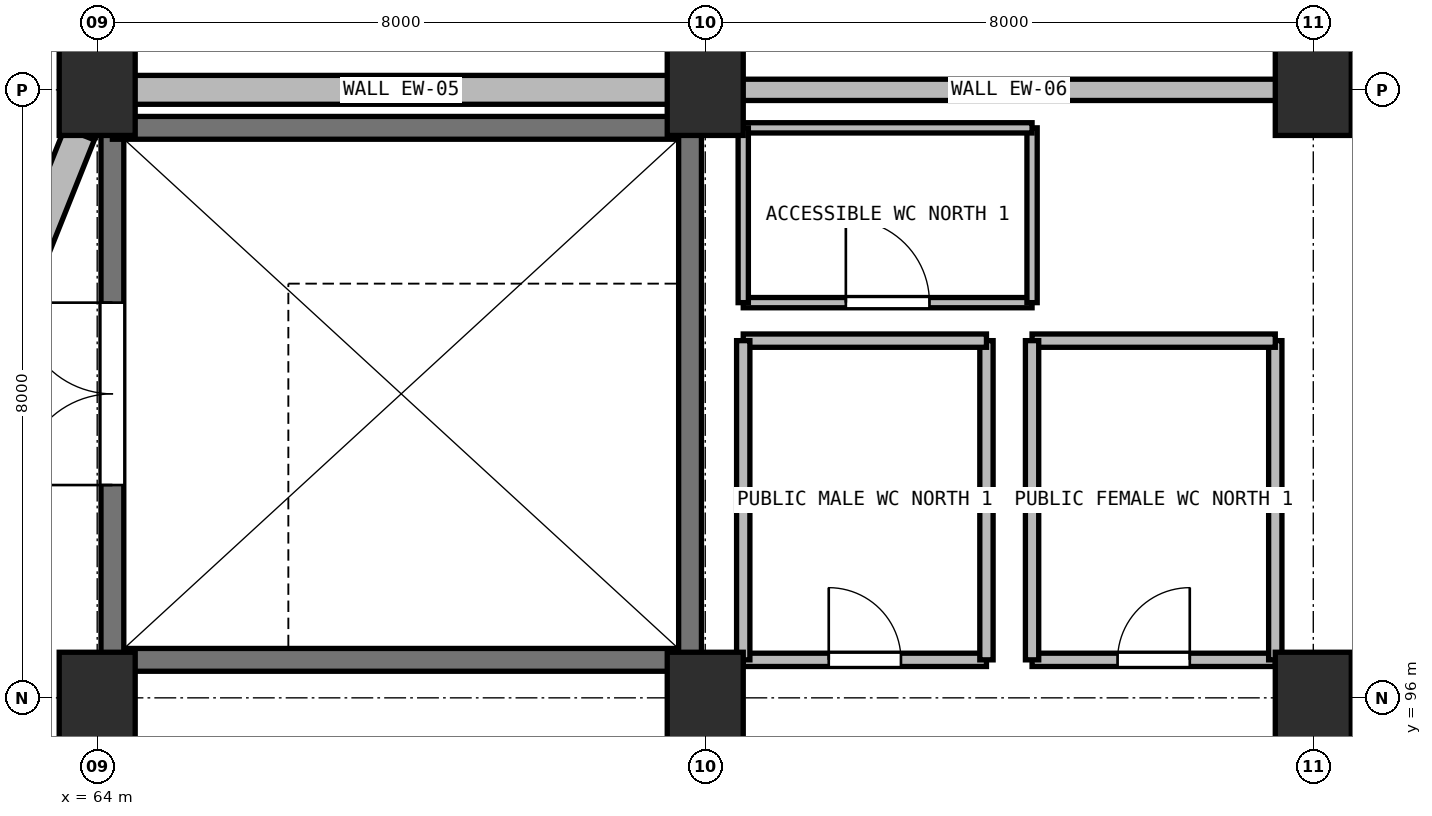
"""IFC4 building model, lengths in metres.
Left out: names, types, materials, properties, quantities, classifications, styles, units other than length and angle.
Written with IfcOpenShell. Run it as: python <this file> out.ifc"""

import sys

from ifc_helpers import new_model, si_unit, direction, frame, frame_2d, origin, origin_2d, place, context, subcontext, project, spatial, rectangle, extrude, element, fill, save


model = new_model("IFC4")
c1 = context("Model", 3, precision=1e-05, world=origin(), true_north=direction((0.0, 1.0)))
c2 = subcontext(c1, "Body", "Model", "MODEL_VIEW")
j1 = project(units=[si_unit("LENGTHUNIT", "METRE"), si_unit("PLANEANGLEUNIT", "RADIAN")], contexts=[c1])
p1 = place(None, origin())
s1 = spatial("IfcSite", under=j1, at=p1, CompositionType="ELEMENT")
p2 = place(p1, origin())
s2 = spatial("IfcBuilding", under=s1, at=p2, CompositionType="ELEMENT")
p3 = place(p2, frame((0.0, 0.0, 24.6)))
s3 = spatial("IfcBuildingStorey", under=s2, at=p3, CompositionType="ELEMENT", Elevation=24.6)
for number, where, z_axis, x_axis in (
    (1, (64.0, 96.0, 0.0), (0.0, 0.0, 1.0), (1.0, 0.0, 0.0)),
    (2, (64.0, 104.0, 0.0), (0.0, 0.0, 1.0), (1.0, 0.0, 0.0)),
    (3, (72.0, 96.0, 0.0), (0.0, 0.0, 1.0), (1.0, 0.0, 0.0)),
    (4, (72.0, 104.0, 0.0), (0.0, 0.0, 1.0), (1.0, 0.0, 0.0)),
    (5, (80.0, 96.0, 0.0), (0.0, 0.0, 1.0), (1.0, 0.0, 0.0)),
    (6, (80.0, 104.0, 0.0), (0.0, 0.0, 1.0), (1.0, 0.0, 0.0)),
):
    element("IfcColumn", number, at=place(p3, frame(where, z_axis=z_axis, x_axis=x_axis)), inside=s3, PredefinedType="COLUMN", context=c2, shape_type="SweptSolid", body=[
        extrude(rectangle(XDim=1.0, YDim=1.2, at=origin_2d()), origin(), (0.0, 0.0, 1.0), 4.8),
    ])
p4 = place(p3, frame((64.48, 104.0, 0.0), z_axis=(0.0, 0.0, 1.0), x_axis=(1.0, 0.0, 0.0)))
e7 = element("IfcWall", 7, at=p4, inside=s3, PredefinedType="SOLIDWALL", context=c2, shape_type="SweptSolid", body=[
    extrude(rectangle(XDim=7.04, YDim=0.38, at=frame_2d((3.52, 0.0))), origin(), (0.0, 0.0, 1.0), 3.71),
])
p5 = place(p3, frame((72.48, 104.0, 0.0), z_axis=(0.0, 0.0, 1.0), x_axis=(1.0, 0.0, 0.0)))
e8 = element("IfcWall", 8, at=p5, inside=s3, PredefinedType="SOLIDWALL", context=c2, shape_type="SweptSolid", body=[
    extrude(rectangle(XDim=7.04, YDim=0.28, at=frame_2d((3.52, 0.0))), origin(), (0.0, 0.0, 1.0), 3.71),
])
p6 = place(p3, frame((80.48, 104.0, 0.0), z_axis=(0.0, 0.0, 1.0), x_axis=(1.0, 0.0, 0.0)))
e9 = element("IfcWall", 9, at=p6, inside=s3, PredefinedType="SOLIDWALL", context=c2, shape_type="SweptSolid", body=[
    extrude(rectangle(XDim=7.04, YDim=0.29, at=frame_2d((3.52, 0.0))), origin(), (0.0, 0.0, 1.0), 3.71),
])
p7 = place(p3, frame((60.8, 96.0, 0.0), z_axis=(0.0, 0.0, 1.0), x_axis=(0.371395943584, 0.928474583976, 0.0)))
e10 = element("IfcWall", 10, at=p7, inside=s3, PredefinedType="SOLIDWALL", context=c2, shape_type="SweptSolid", body=[
    extrude(rectangle(XDim=7.991, YDim=0.42, at=frame_2d((3.996, 0.0))), origin(), (0.0, 0.0, 1.0), 2.86),
])
p8 = place(p3, frame((71.8, 96.5, 0.0), z_axis=(0.0, 0.0, 1.0), x_axis=(-1.0, 0.0, 0.0)))
e11 = element("IfcWall", 11, at=p8, inside=s3, PredefinedType="SHEAR", context=c2, shape_type="SweptSolid", body=[
    extrude(rectangle(XDim=7.6, YDim=0.3, at=frame_2d((3.8, 0.0))), origin(), (0.0, 0.0, 1.0), 4.55),
])
p9 = place(p3, frame((64.2, 96.5, 0.0), z_axis=(0.0, 0.0, 1.0), x_axis=(0.0, 1.0, 0.0)))
e12 = element("IfcWall", 12, at=p9, inside=s3, PredefinedType="SHEAR", context=c2, shape_type="SweptSolid", body=[
    extrude(rectangle(XDim=7.0, YDim=0.3, at=frame_2d((3.5, 0.0))), origin(), (0.0, 0.0, 1.0), 4.55),
])
p10 = place(p9, frame((2.3, 0.0, 0.0)))
e13 = element("IfcOpeningElement", 13, at=p10, cuts=e12, PredefinedType="OPENING", context=c2, shape_type="SweptSolid", body=[
    extrude(rectangle(XDim=2.4, YDim=2.2, at=frame_2d((1.2, 1.1))), frame((0.0, 0.16, 0.0), z_axis=(0.0, -1.0, 0.0), x_axis=(1.0, 0.0, 0.0)), (0.0, 0.0, 1.0), 0.32),
])
p11 = place(p3, frame((64.2, 103.5, 0.0), z_axis=(0.0, 0.0, 1.0), x_axis=(1.0, 0.0, 0.0)))
e14 = element("IfcWall", 14, at=p11, inside=s3, PredefinedType="SHEAR", context=c2, shape_type="SweptSolid", body=[
    extrude(rectangle(XDim=7.6, YDim=0.3, at=frame_2d((3.8, 0.0))), origin(), (0.0, 0.0, 1.0), 4.55),
])
p12 = place(p3, frame((71.8, 103.5, 0.0), z_axis=(0.0, 0.0, 1.0), x_axis=(0.0, -1.0, 0.0)))
e15 = element("IfcWall", 15, at=p12, inside=s3, PredefinedType="SHEAR", context=c2, shape_type="SweptSolid", body=[
    extrude(rectangle(XDim=7.0, YDim=0.3, at=frame_2d((3.5, 0.0))), origin(), (0.0, 0.0, 1.0), 4.55),
])
p13 = place(p3, frame((72.5, 96.5, 0.0), z_axis=(0.0, 0.0, 1.0), x_axis=(1.0, 0.0, 0.0)))
e16 = element("IfcWall", 16, at=p13, inside=s3, PredefinedType="PARTITIONING", context=c2, shape_type="SweptSolid", body=[
    extrude(rectangle(XDim=3.2, YDim=0.175, at=frame_2d((1.6, 0.0))), origin(), (0.0, 0.0, 1.0), 3.71),
])
p14 = place(p13, frame((1.125, 0.0, 0.0)))
e17 = element("IfcOpeningElement", 17, at=p14, cuts=e16, PredefinedType="OPENING", context=c2, shape_type="SweptSolid", body=[
    extrude(rectangle(XDim=0.95, YDim=2.15, at=frame_2d((0.475, 1.075))), frame((0.0, 0.098, 0.0), z_axis=(0.0, -1.0, 0.0), x_axis=(1.0, 0.0, 0.0)), (0.0, 0.0, 1.0), 0.195),
])
p15 = place(p3, frame((75.7, 96.5, 0.0), z_axis=(0.0, 0.0, 1.0), x_axis=(0.0, 1.0, 0.0)))
e18 = element("IfcWall", 18, at=p15, inside=s3, PredefinedType="PARTITIONING", context=c2, shape_type="SweptSolid", body=[
    extrude(rectangle(XDim=4.2, YDim=0.175, at=frame_2d((2.1, 0.0))), origin(), (0.0, 0.0, 1.0), 4.55),
])
p16 = place(p3, frame((75.7, 100.7, 0.0), z_axis=(0.0, 0.0, 1.0), x_axis=(-1.0, 0.0, 0.0)))
e19 = element("IfcWall", 19, at=p16, inside=s3, PredefinedType="PARTITIONING", context=c2, shape_type="SweptSolid", body=[
    extrude(rectangle(XDim=3.2, YDim=0.175, at=frame_2d((1.6, 0.0))), origin(), (0.0, 0.0, 1.0), 4.55),
])
p17 = place(p3, frame((72.5, 100.7, 0.0), z_axis=(0.0, 0.0, 1.0), x_axis=(0.0, -1.0, 0.0)))
e20 = element("IfcWall", 20, at=p17, inside=s3, PredefinedType="PARTITIONING", context=c2, shape_type="SweptSolid", body=[
    extrude(rectangle(XDim=4.2, YDim=0.175, at=frame_2d((2.1, 0.0))), origin(), (0.0, 0.0, 1.0), 3.71),
])
p18 = place(p3, frame((76.3, 96.5, 0.0), z_axis=(0.0, 0.0, 1.0), x_axis=(1.0, 0.0, 0.0)))
e21 = element("IfcWall", 21, at=p18, inside=s3, PredefinedType="PARTITIONING", context=c2, shape_type="SweptSolid", body=[
    extrude(rectangle(XDim=3.2, YDim=0.175, at=frame_2d((1.6, 0.0))), origin(), (0.0, 0.0, 1.0), 3.71),
])
p19 = place(p18, frame((1.125, 0.0, 0.0)))
e22 = element("IfcOpeningElement", 22, at=p19, cuts=e21, PredefinedType="OPENING", context=c2, shape_type="SweptSolid", body=[
    extrude(rectangle(XDim=0.95, YDim=2.15, at=frame_2d((0.475, 1.075))), frame((0.0, 0.098, 0.0), z_axis=(0.0, -1.0, 0.0), x_axis=(1.0, 0.0, 0.0)), (0.0, 0.0, 1.0), 0.195),
])
p20 = place(p3, frame((79.5, 96.5, 0.0), z_axis=(0.0, 0.0, 1.0), x_axis=(0.0, 1.0, 0.0)))
e23 = element("IfcWall", 23, at=p20, inside=s3, PredefinedType="PARTITIONING", context=c2, shape_type="SweptSolid", body=[
    extrude(rectangle(XDim=4.2, YDim=0.175, at=frame_2d((2.1, 0.0))), origin(), (0.0, 0.0, 1.0), 3.71),
])
p21 = place(p3, frame((79.5, 100.7, 0.0), z_axis=(0.0, 0.0, 1.0), x_axis=(-1.0, 0.0, 0.0)))
e24 = element("IfcWall", 24, at=p21, inside=s3, PredefinedType="PARTITIONING", context=c2, shape_type="SweptSolid", body=[
    extrude(rectangle(XDim=3.2, YDim=0.175, at=frame_2d((1.6, 0.0))), origin(), (0.0, 0.0, 1.0), 4.55),
])
p22 = place(p3, frame((76.3, 100.7, 0.0), z_axis=(0.0, 0.0, 1.0), x_axis=(0.0, -1.0, 0.0)))
e25 = element("IfcWall", 25, at=p22, inside=s3, PredefinedType="PARTITIONING", context=c2, shape_type="SweptSolid", body=[
    extrude(rectangle(XDim=4.2, YDim=0.175, at=frame_2d((2.1, 0.0))), origin(), (0.0, 0.0, 1.0), 4.55),
])
p23 = place(p3, frame((72.5, 101.2, 0.0), z_axis=(0.0, 0.0, 1.0), x_axis=(1.0, 0.0, 0.0)))
e26 = element("IfcWall", 26, at=p23, inside=s3, PredefinedType="PARTITIONING", context=c2, shape_type="SweptSolid", body=[
    extrude(rectangle(XDim=3.8, YDim=0.135, at=frame_2d((1.9, 0.0))), origin(), (0.0, 0.0, 1.0), 4.55),
])
p24 = place(p23, frame((1.35, 0.0, 0.0)))
e27 = element("IfcOpeningElement", 27, at=p24, cuts=e26, PredefinedType="OPENING", context=c2, shape_type="SweptSolid", body=[
    extrude(rectangle(XDim=1.1, YDim=2.15, at=frame_2d((0.55, 1.075))), frame((0.0, 0.078, 0.0), z_axis=(0.0, -1.0, 0.0), x_axis=(1.0, 0.0, 0.0)), (0.0, 0.0, 1.0), 0.155),
])
p25 = place(p3, frame((76.3, 101.2, 0.0), z_axis=(0.0, 0.0, 1.0), x_axis=(0.0, 1.0, 0.0)))
e28 = element("IfcWall", 28, at=p25, inside=s3, PredefinedType="PARTITIONING", context=c2, shape_type="SweptSolid", body=[
    extrude(rectangle(XDim=2.3, YDim=0.135, at=frame_2d((1.15, 0.0))), origin(), (0.0, 0.0, 1.0), 4.55),
])
p26 = place(p3, frame((76.3, 103.5, 0.0), z_axis=(0.0, 0.0, 1.0), x_axis=(-1.0, 0.0, 0.0)))
e29 = element("IfcWall", 29, at=p26, inside=s3, PredefinedType="PARTITIONING", context=c2, shape_type="SweptSolid", body=[
    extrude(rectangle(XDim=3.8, YDim=0.135, at=frame_2d((1.9, 0.0))), origin(), (0.0, 0.0, 1.0), 3.71),
])
p27 = place(p3, frame((72.5, 103.5, 0.0), z_axis=(0.0, 0.0, 1.0), x_axis=(0.0, -1.0, 0.0)))
e30 = element("IfcWall", 30, at=p27, inside=s3, PredefinedType="PARTITIONING", context=c2, shape_type="SweptSolid", body=[
    extrude(rectangle(XDim=2.3, YDim=0.135, at=frame_2d((1.15, 0.0))), origin(), (0.0, 0.0, 1.0), 3.71),
])
p28 = place(p10, frame((2.4, 0.0, 0.0), z_axis=(0.0, 0.0, 1.0), x_axis=(-1.0, 0.0, 0.0)))
e31 = element("IfcDoor", 31, at=p28, inside=s3, OperationType="DOUBLE_DOOR_SINGLE_SWING", PredefinedType="DOOR", context=c2, shape_type="SweptSolid", body=[
    extrude(rectangle(XDim=2.4, YDim=2.2, at=frame_2d((1.2, 1.1))), frame((0.0, 0.025, 0.0), z_axis=(0.0, -1.0, 0.0), x_axis=(1.0, 0.0, 0.0)), (0.0, 0.0, 1.0), 0.05),
])
fill(e13, e31)
p29 = place(p14, origin())
e32 = element("IfcDoor", 32, at=p29, inside=s3, OperationType="SINGLE_SWING_LEFT", PredefinedType="DOOR", context=c2, shape_type="SweptSolid", body=[
    extrude(rectangle(XDim=0.95, YDim=2.15, at=frame_2d((0.475, 1.075))), frame((0.0, 0.025, 0.0), z_axis=(0.0, -1.0, 0.0), x_axis=(1.0, 0.0, 0.0)), (0.0, 0.0, 1.0), 0.05),
])
fill(e17, e32)
p30 = place(p19, origin())
e33 = element("IfcDoor", 33, at=p30, inside=s3, OperationType="SINGLE_SWING_RIGHT", PredefinedType="DOOR", context=c2, shape_type="SweptSolid", body=[
    extrude(rectangle(XDim=0.95, YDim=2.15, at=frame_2d((0.475, 1.075))), frame((0.0, 0.025, 0.0), z_axis=(0.0, -1.0, 0.0), x_axis=(1.0, 0.0, 0.0)), (0.0, 0.0, 1.0), 0.05),
])
fill(e22, e33)
p31 = place(p24, origin())
e34 = element("IfcDoor", 34, at=p31, inside=s3, OperationType="SINGLE_SWING_LEFT", PredefinedType="DOOR", context=c2, shape_type="SweptSolid", body=[
    extrude(rectangle(XDim=1.1, YDim=2.15, at=frame_2d((0.55, 1.075))), frame((0.0, 0.025, 0.0), z_axis=(0.0, -1.0, 0.0), x_axis=(1.0, 0.0, 0.0)), (0.0, 0.0, 1.0), 0.05),
])
fill(e27, e34)
save(model, sys.argv[1])
